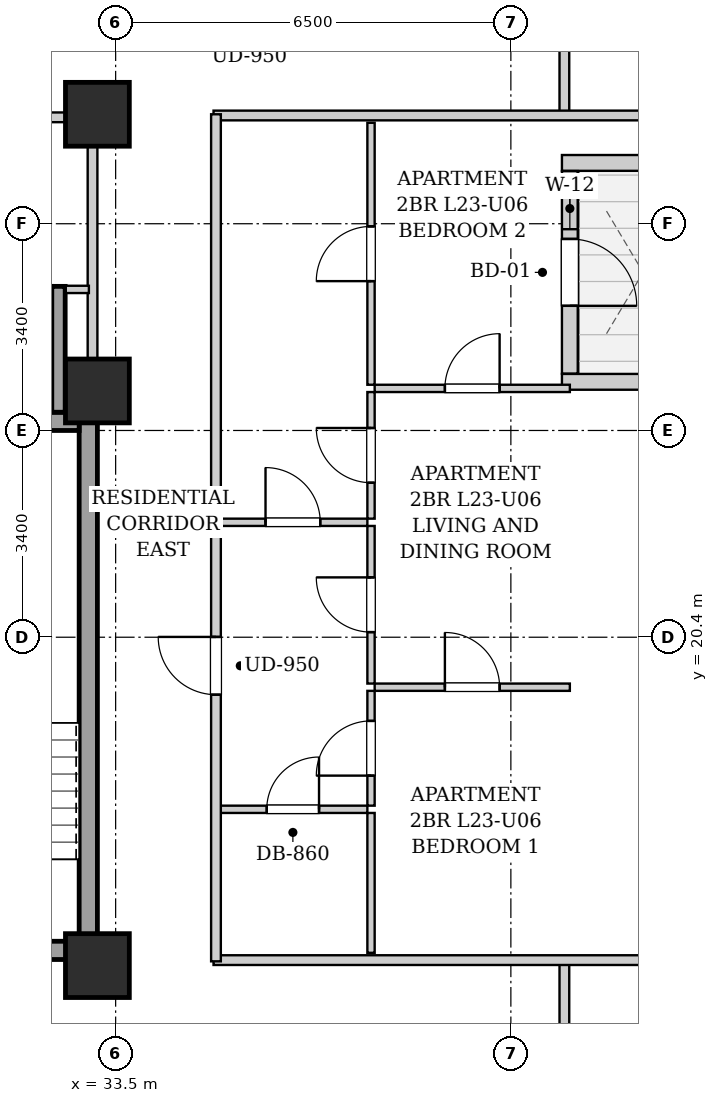
"""IFC4 building model, lengths in metres.
Left out: names, types, materials, properties, quantities, classifications, styles, units other than length and angle.
Written with IfcOpenShell. Run it as: python <this file> out.ifc"""

import sys

from ifc_helpers import new_model, si_unit, direction, frame, frame_2d, origin, origin_2d, place, context, subcontext, project, spatial, rectangle, extrude, element, fill, save


model = new_model("IFC4")
c1 = context("Model", 3, precision=1e-05, world=origin(), true_north=direction((0.0, 1.0)))
c2 = subcontext(c1, "Body", "Model", "MODEL_VIEW")
j1 = project(units=[si_unit("LENGTHUNIT", "METRE"), si_unit("PLANEANGLEUNIT", "RADIAN")], contexts=[c1])
p1 = place(None, origin())
s1 = spatial("IfcSite", under=j1, at=p1, CompositionType="ELEMENT")
p2 = place(p1, origin())
s2 = spatial("IfcBuilding", under=s1, at=p2, CompositionType="ELEMENT")
p3 = place(p2, frame((0.0, 0.0, 84.7)))
s3 = spatial("IfcBuildingStorey", under=s2, at=p3, CompositionType="ELEMENT", Elevation=84.7)
for number, where, z_axis, x_axis in (
    (1, (33.2, 15.0, 0.0), (0.0, 0.0, 1.0), (1.0, 0.0, 0.0)),
    (2, (33.2, 29.0, 0.0), (0.0, 0.0, 1.0), (1.0, 0.0, 0.0)),
    (3, (33.2, 24.45, 0.0), (0.0, 0.0, 1.0), (1.0, 0.0, 0.0)),
):
    element("IfcColumn", number, at=place(p3, frame(where, z_axis=z_axis, x_axis=x_axis)), inside=s3, PredefinedType="COLUMN", context=c2, shape_type="SweptSolid", body=[
        extrude(rectangle(XDim=1.05, YDim=1.05, at=origin_2d()), origin(), (0.0, 0.0, 1.0), 3.2),
    ])
p4 = place(p3, frame((43.24, 28.2, 0.0), z_axis=(0.0, 0.0, 1.0), x_axis=(-1.0, 0.0, 0.0)))
e4 = element("IfcWall", 4, at=p4, inside=s3, PredefinedType="SOLIDWALL", context=c2, shape_type="SweptSolid", body=[
    extrude(rectangle(XDim=2.4, YDim=0.26, at=frame_2d((1.2, 0.0))), origin(), (0.0, 0.0, 1.0), 2.94),
])
p5 = place(p3, frame((40.97, 28.066, 0.0), z_axis=(0.0, 0.0, 1.0), x_axis=(0.0, -1.0, 0.0)))
e5 = element("IfcWall", 5, at=p5, inside=s3, PredefinedType="SOLIDWALL", context=c2, shape_type="SweptSolid", body=[
    extrude(rectangle(XDim=3.332, YDim=0.26, at=frame_2d((1.666, 0.0))), origin(), (0.0, 0.0, 1.0), 2.94),
])
p6 = place(p5, frame((1.116, 0.0, 0.0)))
e6 = element("IfcOpeningElement", 6, at=p6, cuts=e5, PredefinedType="OPENING", context=c2, shape_type="SweptSolid", body=[
    extrude(rectangle(XDim=1.1, YDim=2.0, at=frame_2d((0.55, 1.0))), frame((0.0, 0.14, 0.0), z_axis=(0.0, -1.0, 0.0), x_axis=(1.0, 0.0, 0.0)), (0.0, 0.0, 1.0), 0.28),
])
p7 = place(p5, frame((0.276, 0.0, 0.55)))
e7 = element("IfcOpeningElement", 7, at=p7, cuts=e5, PredefinedType="OPENING", context=c2, shape_type="SweptSolid", body=[
    extrude(rectangle(XDim=0.68, YDim=1.2, at=frame_2d((0.34, 0.6))), frame((0.0, 0.14, 0.0), z_axis=(0.0, -1.0, 0.0), x_axis=(1.0, 0.0, 0.0)), (0.0, 0.0, 1.0), 0.28),
])
p8 = place(p3, frame((40.84, 24.6, 0.0), z_axis=(0.0, 0.0, 1.0), x_axis=(1.0, 0.0, 0.0)))
e8 = element("IfcWall", 8, at=p8, inside=s3, PredefinedType="SOLIDWALL", context=c2, shape_type="SweptSolid", body=[
    extrude(rectangle(XDim=2.4, YDim=0.26, at=frame_2d((1.2, 0.0))), origin(), (0.0, 0.0, 1.0), 2.94),
])
p9 = place(p3, frame((33.05, 15.1, 0.0), z_axis=(0.0, 0.0, 1.0), x_axis=(0.0, 1.0, 0.0)))
e9 = element("IfcWall", 9, at=p9, inside=s3, PredefinedType="SHEAR", context=c2, shape_type="SweptSolid", body=[
    extrude(rectangle(XDim=9.0, YDim=0.3, at=frame_2d((4.5, 0.0))), origin(), (0.0, 0.0, 1.0), 2.94),
])
p10 = place(p3, frame((30.05, 23.95, 0.0), z_axis=(0.0, 0.0, 1.0), x_axis=(1.0, 0.0, 0.0)))
e10 = element("IfcWall", 10, at=p10, inside=s3, PredefinedType="SHEAR", context=c2, shape_type="SweptSolid", body=[
    extrude(rectangle(XDim=2.85, YDim=0.3, at=frame_2d((1.425, 0.0))), origin(), (0.0, 0.0, 1.0), 2.94),
])
p11 = place(p3, frame((30.05, 15.25, 0.0), z_axis=(0.0, 0.0, 1.0), x_axis=(1.0, 0.0, 0.0)))
e11 = element("IfcWall", 11, at=p11, inside=s3, PredefinedType="SHEAR", context=c2, shape_type="SweptSolid", body=[
    extrude(rectangle(XDim=2.85, YDim=0.3, at=frame_2d((1.425, 0.0))), origin(), (0.0, 0.0, 1.0), 2.94),
])
p12 = place(p11, frame((0.86, 0.0, 0.0)))
e12 = element("IfcOpeningElement", 12, at=p12, cuts=e11, PredefinedType="OPENING", context=c2, shape_type="SweptSolid", body=[
    extrude(rectangle(XDim=1.1, YDim=2.05, at=frame_2d((0.55, 1.025))), frame((0.0, 0.16, 0.0), z_axis=(0.0, -1.0, 0.0), x_axis=(1.0, 0.0, 0.0)), (0.0, 0.0, 1.0), 0.32),
])
p13 = place(p3, frame((32.56, 24.1, 0.0), z_axis=(0.0, 0.0, 1.0), x_axis=(0.0, 1.0, 0.0)))
e13 = element("IfcWall", 13, at=p13, inside=s3, PredefinedType="SHEAR", context=c2, shape_type="SweptSolid", body=[
    extrude(rectangle(XDim=2.07, YDim=0.22, at=frame_2d((1.035, 0.0))), origin(), (0.0, 0.0, 1.0), 2.94),
])
p14 = place(p3, frame((33.12, 24.12, 0.0), z_axis=(0.0, 0.0, 1.0), x_axis=(0.0, 1.0, 0.0)))
e14 = element("IfcWall", 14, at=p14, inside=s3, PredefinedType="PARTITIONING", context=c2, shape_type="SweptSolid", body=[
    extrude(rectangle(XDim=4.76, YDim=0.16, at=frame_2d((2.38, 0.0))), origin(), (0.0, 0.0, 1.0), 2.94),
])
p15 = place(p3, frame((32.68, 26.12, 0.0), z_axis=(0.0, 0.0, 1.0), x_axis=(1.0, 0.0, 0.0)))
e15 = element("IfcWall", 15, at=p15, inside=s3, PredefinedType="PARTITIONING", context=c2, shape_type="SweptSolid", body=[
    extrude(rectangle(XDim=0.38, YDim=0.12, at=frame_2d((0.19, 0.0))), origin(), (0.0, 0.0, 1.0), 2.94),
])
p16 = place(p3, frame((30.08, 28.95, 0.0), z_axis=(0.0, 0.0, 1.0), x_axis=(1.0, 0.0, 0.0)))
e16 = element("IfcWall", 16, at=p16, inside=s3, PredefinedType="PARTITIONING", context=c2, shape_type="SweptSolid", body=[
    extrude(rectangle(XDim=2.96, YDim=0.16, at=frame_2d((1.48, 0.0))), origin(), (0.0, 0.0, 1.0), 2.94),
])
p17 = place(p16, frame((1.045, 0.0, 0.0)))
e17 = element("IfcOpeningElement", 17, at=p17, cuts=e16, PredefinedType="OPENING", context=c2, shape_type="SweptSolid", body=[
    extrude(rectangle(XDim=0.86, YDim=2.05, at=frame_2d((0.43, 1.025))), frame((0.0, 0.09, 0.0), z_axis=(0.0, -1.0, 0.0), x_axis=(1.0, 0.0, 0.0)), (0.0, 0.0, 1.0), 0.18),
])
for number, where, z_axis, x_axis in (
    (18, (40.88, 13.35, 0.0), (0.0, 0.0, 1.0), (0.0, 1.0, 0.0)),
    (19, (40.88, 28.98, 0.0), (0.0, 0.0, 1.0), (0.0, 1.0, 0.0)),
):
    element("IfcWall", number, at=place(p3, frame(where, z_axis=z_axis, x_axis=x_axis)), inside=s3, PredefinedType="PARTITIONING", context=c2, shape_type="SweptSolid", body=[
        extrude(rectangle(XDim=1.74, YDim=0.16, at=frame_2d((0.87, 0.0))), origin(), (0.0, 0.0, 1.0), 2.94),
    ])
for number, where, z_axis, x_axis in (
    (20, (35.11, 15.09, 0.0), (0.0, 0.0, 1.0), (1.0, 0.0, 0.0)),
    (21, (35.11, 28.98, 0.0), (0.0, 0.0, 1.0), (1.0, 0.0, 0.0)),
):
    element("IfcWall", number, at=place(p3, frame(where, z_axis=z_axis, x_axis=x_axis)), inside=s3, PredefinedType="PARTITIONING", context=c2, shape_type="SweptSolid", body=[
        extrude(rectangle(XDim=8.01, YDim=0.16, at=frame_2d((4.005, 0.0))), origin(), (0.0, 0.0, 1.0), 2.309),
    ])
p18 = place(p3, frame((35.19, 22.29, 0.0), z_axis=(0.0, 0.0, 1.0), x_axis=(1.0, 0.0, 0.0)))
e22 = element("IfcWall", 22, at=p18, inside=s3, PredefinedType="PARTITIONING", context=c2, shape_type="SweptSolid", body=[
    extrude(rectangle(XDim=2.45, YDim=0.12, at=frame_2d((1.225, 0.0))), origin(), (0.0, 0.0, 1.0), 2.94),
])
p19 = place(p18, frame((0.775, 0.0, 0.0)))
e23 = element("IfcOpeningElement", 23, at=p19, cuts=e22, PredefinedType="OPENING", context=c2, shape_type="SweptSolid", body=[
    extrude(rectangle(XDim=0.9, YDim=2.05, at=frame_2d((0.45, 1.025))), frame((0.0, 0.07, 0.0), z_axis=(0.0, -1.0, 0.0), x_axis=(1.0, 0.0, 0.0)), (0.0, 0.0, 1.0), 0.14),
])
p20 = place(p3, frame((37.7, 22.35, 0.0), z_axis=(0.0, 0.0, 1.0), x_axis=(0.0, 1.0, 0.0)))
e24 = element("IfcWall", 24, at=p20, inside=s3, PredefinedType="PARTITIONING", context=c2, shape_type="SweptSolid", body=[
    extrude(rectangle(XDim=2.082, YDim=0.12, at=frame_2d((1.041, 0.0))), origin(), (0.0, 0.0, 1.0), 2.94),
])
p21 = place(p20, frame((0.591, 0.0, 0.0)))
e25 = element("IfcOpeningElement", 25, at=p21, cuts=e24, PredefinedType="OPENING", context=c2, shape_type="SweptSolid", body=[
    extrude(rectangle(XDim=0.9, YDim=2.05, at=frame_2d((0.45, 1.025))), frame((0.0, 0.07, 0.0), z_axis=(0.0, -1.0, 0.0), x_axis=(1.0, 0.0, 0.0)), (0.0, 0.0, 1.0), 0.14),
])
p22 = place(p3, frame((37.7, 24.552, 0.0), z_axis=(0.0, 0.0, 1.0), x_axis=(0.0, 1.0, 0.0)))
e26 = element("IfcWall", 26, at=p22, inside=s3, PredefinedType="PARTITIONING", context=c2, shape_type="SweptSolid", body=[
    extrude(rectangle(XDim=4.308, YDim=0.12, at=frame_2d((2.154, 0.0))), origin(), (0.0, 0.0, 1.0), 2.94),
])
p23 = place(p22, frame((1.704, 0.0, 0.0)))
e27 = element("IfcOpeningElement", 27, at=p23, cuts=e26, PredefinedType="OPENING", context=c2, shape_type="SweptSolid", body=[
    extrude(rectangle(XDim=0.9, YDim=2.05, at=frame_2d((0.45, 1.025))), frame((0.0, 0.07, 0.0), z_axis=(0.0, -1.0, 0.0), x_axis=(1.0, 0.0, 0.0)), (0.0, 0.0, 1.0), 0.14),
])
p24 = place(p3, frame((35.19, 17.57, 0.0), z_axis=(0.0, 0.0, 1.0), x_axis=(1.0, 0.0, 0.0)))
e28 = element("IfcWall", 28, at=p24, inside=s3, PredefinedType="PARTITIONING", context=c2, shape_type="SweptSolid", body=[
    extrude(rectangle(XDim=2.45, YDim=0.12, at=frame_2d((1.225, 0.0))), origin(), (0.0, 0.0, 1.0), 2.94),
])
p25 = place(p24, frame((0.795, 0.0, 0.0)))
e29 = element("IfcOpeningElement", 29, at=p25, cuts=e28, PredefinedType="OPENING", context=c2, shape_type="SweptSolid", body=[
    extrude(rectangle(XDim=0.86, YDim=2.05, at=frame_2d((0.43, 1.025))), frame((0.0, 0.07, 0.0), z_axis=(0.0, -1.0, 0.0), x_axis=(1.0, 0.0, 0.0)), (0.0, 0.0, 1.0), 0.14),
])
p26 = place(p3, frame((37.7, 15.21, 0.0), z_axis=(0.0, 0.0, 1.0), x_axis=(0.0, 1.0, 0.0)))
e30 = element("IfcWall", 30, at=p26, inside=s3, PredefinedType="PARTITIONING", context=c2, shape_type="SweptSolid", body=[
    extrude(rectangle(XDim=2.3, YDim=0.12, at=frame_2d((1.15, 0.0))), origin(), (0.0, 0.0, 1.0), 2.94),
])
p27 = place(p3, frame((37.7, 17.63, 0.0), z_axis=(0.0, 0.0, 1.0), x_axis=(0.0, 1.0, 0.0)))
e31 = element("IfcWall", 31, at=p27, inside=s3, PredefinedType="PARTITIONING", context=c2, shape_type="SweptSolid", body=[
    extrude(rectangle(XDim=1.888, YDim=0.12, at=frame_2d((0.944, 0.0))), origin(), (0.0, 0.0, 1.0), 2.94),
])
p28 = place(p27, frame((0.494, 0.0, 0.0)))
e32 = element("IfcOpeningElement", 32, at=p28, cuts=e31, PredefinedType="OPENING", context=c2, shape_type="SweptSolid", body=[
    extrude(rectangle(XDim=0.9, YDim=2.05, at=frame_2d((0.45, 1.025))), frame((0.0, 0.07, 0.0), z_axis=(0.0, -1.0, 0.0), x_axis=(1.0, 0.0, 0.0)), (0.0, 0.0, 1.0), 0.14),
])
p29 = place(p3, frame((37.7, 19.638, 0.0), z_axis=(0.0, 0.0, 1.0), x_axis=(0.0, 1.0, 0.0)))
e33 = element("IfcWall", 33, at=p29, inside=s3, PredefinedType="PARTITIONING", context=c2, shape_type="SweptSolid", body=[
    extrude(rectangle(XDim=2.592, YDim=0.12, at=frame_2d((1.296, 0.0))), origin(), (0.0, 0.0, 1.0), 2.94),
])
p30 = place(p29, frame((0.846, 0.0, 0.0)))
e34 = element("IfcOpeningElement", 34, at=p30, cuts=e33, PredefinedType="OPENING", context=c2, shape_type="SweptSolid", body=[
    extrude(rectangle(XDim=0.9, YDim=2.05, at=frame_2d((0.45, 1.025))), frame((0.0, 0.07, 0.0), z_axis=(0.0, -1.0, 0.0), x_axis=(1.0, 0.0, 0.0)), (0.0, 0.0, 1.0), 0.14),
])
p31 = place(p3, frame((37.76, 19.578, 0.0), z_axis=(0.0, 0.0, 1.0), x_axis=(1.0, 0.0, 0.0)))
e35 = element("IfcWall", 35, at=p31, inside=s3, PredefinedType="PARTITIONING", context=c2, shape_type="SweptSolid", body=[
    extrude(rectangle(XDim=3.21, YDim=0.12, at=frame_2d((1.605, 0.0))), origin(), (0.0, 0.0, 1.0), 2.94),
])
p32 = place(p31, frame((1.155, 0.0, 0.0)))
e36 = element("IfcOpeningElement", 36, at=p32, cuts=e35, PredefinedType="OPENING", context=c2, shape_type="SweptSolid", body=[
    extrude(rectangle(XDim=0.9, YDim=2.05, at=frame_2d((0.45, 1.025))), frame((0.0, 0.07, 0.0), z_axis=(0.0, -1.0, 0.0), x_axis=(1.0, 0.0, 0.0)), (0.0, 0.0, 1.0), 0.14),
])
p33 = place(p3, frame((37.76, 24.492, 0.0), z_axis=(0.0, 0.0, 1.0), x_axis=(1.0, 0.0, 0.0)))
e37 = element("IfcWall", 37, at=p33, inside=s3, PredefinedType="PARTITIONING", context=c2, shape_type="SweptSolid", body=[
    extrude(rectangle(XDim=3.21, YDim=0.12, at=frame_2d((1.605, 0.0))), origin(), (0.0, 0.0, 1.0), 2.518),
])
p34 = place(p33, frame((1.155, 0.0, 0.0)))
e38 = element("IfcOpeningElement", 38, at=p34, cuts=e37, PredefinedType="OPENING", context=c2, shape_type="SweptSolid", body=[
    extrude(rectangle(XDim=0.9, YDim=2.05, at=frame_2d((0.45, 1.025))), frame((0.0, 0.07, 0.0), z_axis=(0.0, -1.0, 0.0), x_axis=(1.0, 0.0, 0.0)), (0.0, 0.0, 1.0), 0.14),
])
p35 = place(p3, frame((35.15, 15.07, 0.0), z_axis=(0.0, 0.0, 1.0), x_axis=(0.0, 1.0, 0.0)))
e39 = element("IfcWall", 39, at=p35, inside=s3, PredefinedType="PARTITIONING", context=c2, shape_type="SweptSolid", body=[
    extrude(rectangle(XDim=13.93, YDim=0.16, at=frame_2d((6.965, 0.0))), origin(), (0.0, 0.0, 1.0), 2.94),
])
p36 = place(p35, frame((4.385, 0.0, 0.0)))
e40 = element("IfcOpeningElement", 40, at=p36, cuts=e39, PredefinedType="OPENING", context=c2, shape_type="SweptSolid", body=[
    extrude(rectangle(XDim=0.95, YDim=2.1, at=frame_2d((0.475, 1.05))), frame((0.0, 0.09, 0.0), z_axis=(0.0, -1.0, 0.0), x_axis=(1.0, 0.0, 0.0)), (0.0, 0.0, 1.0), 0.18),
])
p37 = place(p19, origin())
e41 = element("IfcDoor", 41, at=p37, inside=s3, OperationType="SINGLE_SWING_LEFT", PredefinedType="DOOR", context=c2, shape_type="SweptSolid", body=[
    extrude(rectangle(XDim=0.9, YDim=2.05, at=frame_2d((0.45, 1.025))), frame((0.0, 0.025, 0.0), z_axis=(0.0, -1.0, 0.0), x_axis=(1.0, 0.0, 0.0)), (0.0, 0.0, 1.0), 0.05),
])
fill(e23, e41)
p38 = place(p21, origin())
e42 = element("IfcDoor", 42, at=p38, inside=s3, OperationType="SINGLE_SWING_RIGHT", PredefinedType="DOOR", context=c2, shape_type="SweptSolid", body=[
    extrude(rectangle(XDim=0.9, YDim=2.05, at=frame_2d((0.45, 1.025))), frame((0.0, 0.025, 0.0), z_axis=(0.0, -1.0, 0.0), x_axis=(1.0, 0.0, 0.0)), (0.0, 0.0, 1.0), 0.05),
])
fill(e25, e42)
p39 = place(p23, origin())
e43 = element("IfcDoor", 43, at=p39, inside=s3, OperationType="SINGLE_SWING_LEFT", PredefinedType="DOOR", context=c2, shape_type="SweptSolid", body=[
    extrude(rectangle(XDim=0.9, YDim=2.05, at=frame_2d((0.45, 1.025))), frame((0.0, 0.025, 0.0), z_axis=(0.0, -1.0, 0.0), x_axis=(1.0, 0.0, 0.0)), (0.0, 0.0, 1.0), 0.05),
])
fill(e27, e43)
p40 = place(p25, origin())
e44 = element("IfcDoor", 44, at=p40, inside=s3, OperationType="SINGLE_SWING_RIGHT", PredefinedType="DOOR", context=c2, shape_type="SweptSolid", body=[
    extrude(rectangle(XDim=0.86, YDim=2.05, at=frame_2d((0.43, 1.025))), frame((0.0, 0.025, 0.0), z_axis=(0.0, -1.0, 0.0), x_axis=(1.0, 0.0, 0.0)), (0.0, 0.0, 1.0), 0.05),
])
fill(e29, e44)
p41 = place(p28, origin())
e45 = element("IfcDoor", 45, at=p41, inside=s3, OperationType="SINGLE_SWING_LEFT", PredefinedType="DOOR", context=c2, shape_type="SweptSolid", body=[
    extrude(rectangle(XDim=0.9, YDim=2.05, at=frame_2d((0.45, 1.025))), frame((0.0, 0.025, 0.0), z_axis=(0.0, -1.0, 0.0), x_axis=(1.0, 0.0, 0.0)), (0.0, 0.0, 1.0), 0.05),
])
fill(e32, e45)
p42 = place(p30, origin())
e46 = element("IfcDoor", 46, at=p42, inside=s3, OperationType="SINGLE_SWING_RIGHT", PredefinedType="DOOR", context=c2, shape_type="SweptSolid", body=[
    extrude(rectangle(XDim=0.9, YDim=2.05, at=frame_2d((0.45, 1.025))), frame((0.0, 0.025, 0.0), z_axis=(0.0, -1.0, 0.0), x_axis=(1.0, 0.0, 0.0)), (0.0, 0.0, 1.0), 0.05),
])
fill(e34, e46)
p43 = place(p32, origin())
e47 = element("IfcDoor", 47, at=p43, inside=s3, OperationType="SINGLE_SWING_LEFT", PredefinedType="DOOR", context=c2, shape_type="SweptSolid", body=[
    extrude(rectangle(XDim=0.9, YDim=2.05, at=frame_2d((0.45, 1.025))), frame((0.0, 0.025, 0.0), z_axis=(0.0, -1.0, 0.0), x_axis=(1.0, 0.0, 0.0)), (0.0, 0.0, 1.0), 0.05),
])
fill(e36, e47)
p44 = place(p34, origin())
e48 = element("IfcDoor", 48, at=p44, inside=s3, OperationType="SINGLE_SWING_RIGHT", PredefinedType="DOOR", context=c2, shape_type="SweptSolid", body=[
    extrude(rectangle(XDim=0.9, YDim=2.05, at=frame_2d((0.45, 1.025))), frame((0.0, 0.025, 0.0), z_axis=(0.0, -1.0, 0.0), x_axis=(1.0, 0.0, 0.0)), (0.0, 0.0, 1.0), 0.05),
])
fill(e38, e48)
p45 = place(p36, origin())
e49 = element("IfcDoor", 49, at=p45, inside=s3, OperationType="SINGLE_SWING_RIGHT", PredefinedType="DOOR", context=c2, shape_type="SweptSolid", body=[
    extrude(rectangle(XDim=0.95, YDim=2.1, at=frame_2d((0.475, 1.05))), frame((0.0, 0.025, 0.0), z_axis=(0.0, -1.0, 0.0), x_axis=(1.0, 0.0, 0.0)), (0.0, 0.0, 1.0), 0.05),
])
fill(e40, e49)
p46 = place(p6, origin())
e50 = element("IfcDoor", 50, at=p46, inside=s3, OperationType="SINGLE_SWING_RIGHT", PredefinedType="DOOR", context=c2, shape_type="SweptSolid", body=[
    extrude(rectangle(XDim=1.1, YDim=2.0, at=frame_2d((0.55, 1.0))), frame((0.0, 0.025, 0.0), z_axis=(0.0, -1.0, 0.0), x_axis=(1.0, 0.0, 0.0)), (0.0, 0.0, 1.0), 0.05),
])
fill(e6, e50)
p47 = place(p7, origin())
e51 = element("IfcWindow", 51, at=p47, inside=s3, PartitioningType="SINGLE_PANEL", PredefinedType="WINDOW", context=c2, shape_type="SweptSolid", body=[
    extrude(rectangle(XDim=0.68, YDim=1.2, at=frame_2d((0.34, 0.6))), frame((0.0, 0.03, 0.0), z_axis=(0.0, -1.0, 0.0), x_axis=(1.0, 0.0, 0.0)), (0.0, 0.0, 1.0), 0.06),
])
fill(e7, e51)
save(model, sys.argv[1])
